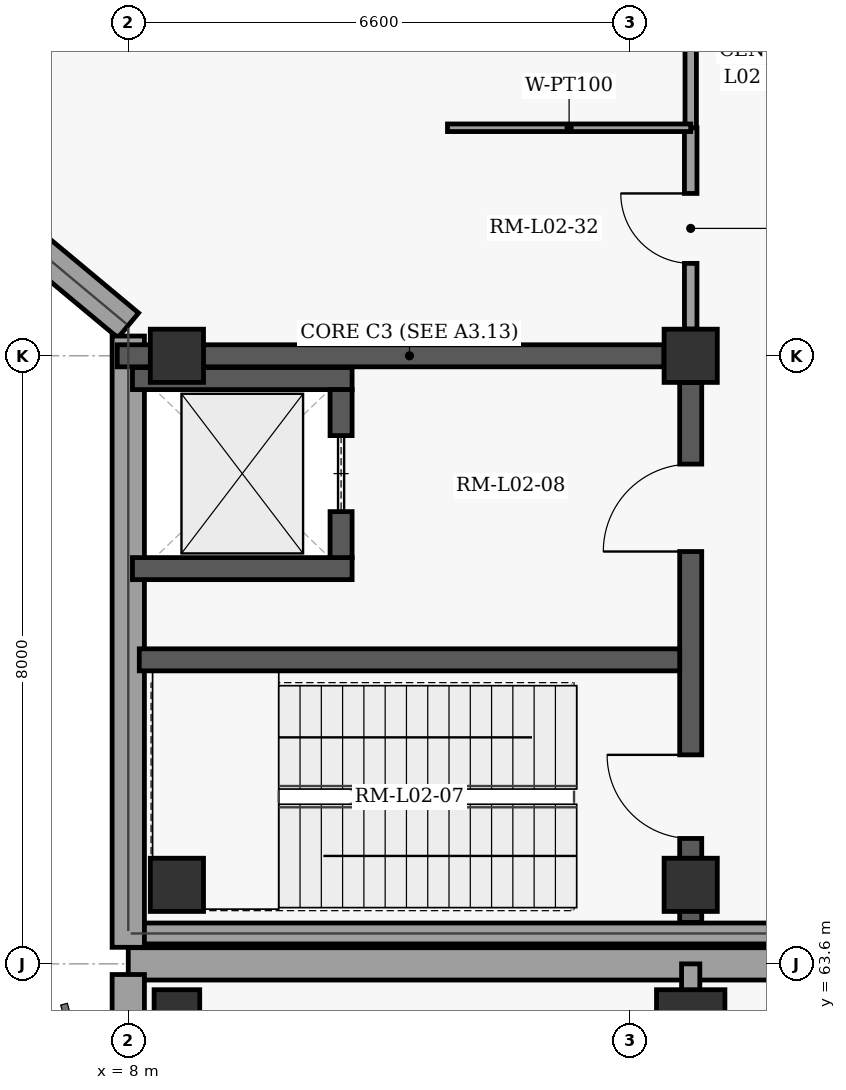
"""IFC4 building model, lengths in metres.
Left out: names, types, materials, properties, quantities, classifications, styles, units other than length and angle.
Written with IfcOpenShell. Run it as: python <this file> out.ifc"""

import sys

from ifc_helpers import new_model, si_unit, direction, frame, frame_2d, origin, origin_2d, place, context, subcontext, project, spatial, rectangle, extrude, element, fill, save


model = new_model("IFC4")
c1 = context("Model", 3, precision=1e-05, world=origin(), true_north=direction((0.0, 1.0)))
c2 = subcontext(c1, "Body", "Model", "MODEL_VIEW")
j1 = project(units=[si_unit("LENGTHUNIT", "METRE"), si_unit("PLANEANGLEUNIT", "RADIAN")], contexts=[c1])
p1 = place(None, origin())
s1 = spatial("IfcSite", under=j1, at=p1, CompositionType="ELEMENT")
p2 = place(p1, origin())
s2 = spatial("IfcBuilding", under=s1, at=p2, CompositionType="ELEMENT")
p3 = place(p2, frame((0.0, 0.0, 10.2)))
s3 = spatial("IfcBuildingStorey", under=s2, at=p3, CompositionType="ELEMENT", Elevation=10.2)
p4 = place(p3, frame((8.64, 62.96, 0.0), z_axis=(0.0, 0.0, 1.0), x_axis=(1.0, 0.0, 0.0)))
e1 = element("IfcColumn", 1, at=p4, inside=s3, PredefinedType="COLUMN", context=c2, shape_type="SweptSolid", body=[
    extrude(rectangle(XDim=0.6, YDim=0.6, at=origin_2d()), origin(), (0.0, 0.0, 1.0), 5.4),
])
p5 = place(p3, frame((15.4, 62.96, 0.0), z_axis=(0.0, 0.0, 1.0), x_axis=(1.0, 0.0, 0.0)))
e2 = element("IfcColumn", 2, at=p5, inside=s3, PredefinedType="COLUMN", context=c2, shape_type="SweptSolid", body=[
    extrude(rectangle(XDim=0.6, YDim=0.9, at=origin_2d()), origin(), (0.0, 0.0, 1.0), 5.4),
])
for number, where, z_axis, x_axis in (
    (3, (8.64, 64.64, 0.0), (0.0, 0.0, 1.0), (1.0, 0.0, 0.0)),
    (4, (8.64, 71.6, 0.0), (0.0, 0.0, 1.0), (1.0, 0.0, 0.0)),
    (5, (15.4, 64.64, 0.0), (0.0, 0.0, 1.0), (1.0, 0.0, 0.0)),
    (6, (15.4, 71.6, 0.0), (0.0, 0.0, 1.0), (1.0, 0.0, 0.0)),
):
    element("IfcColumn", number, at=place(p3, frame(where, z_axis=z_axis, x_axis=x_axis)), inside=s3, PredefinedType="COLUMN", context=c2, shape_type="SweptSolid", body=[
        extrude(rectangle(XDim=0.7, YDim=0.7, at=origin_2d()), origin(), (0.0, 0.0, 1.0), 5.4),
    ])
p6 = place(p3, frame((8.0, 63.6, 0.0), z_axis=(0.0, 0.0, 1.0), x_axis=(1.0, 0.0, 0.0)))
e7 = element("IfcWall", 7, at=p6, inside=s3, PredefinedType="SOLIDWALL", context=c2, shape_type="SweptSolid", body=[
    extrude(rectangle(XDim=38.0, YDim=0.425, at=frame_2d((19.0, 0.0))), origin(), (0.0, 0.0, 1.0), 5.16),
])
p7 = place(p3, frame((8.0, 7.74, 0.0), z_axis=(0.0, 0.0, 1.0), x_axis=(0.0, 1.0, 0.0)))
e8 = element("IfcWall", 8, at=p7, inside=s3, PredefinedType="SOLIDWALL", context=c2, shape_type="SweptSolid", body=[
    extrude(rectangle(XDim=55.72, YDim=0.425, at=frame_2d((27.86, 0.0))), origin(), (0.0, 0.0, 1.0), 5.16),
])
p8 = place(p3, frame((8.0, 72.0, 0.0), z_axis=(0.0, 0.0, 1.0), x_axis=(-0.768208468069, 0.640199773186, 0.0)))
e9 = element("IfcWall", 9, at=p8, inside=s3, PredefinedType="SOLIDWALL", context=c2, shape_type="SweptSolid", body=[
    extrude(rectangle(XDim=3.124, YDim=0.425, at=frame_2d((1.562, 0.0))), origin(), (0.0, 0.0, 1.0), 5.1),
])
p9 = place(p3, frame((40.2, 64.0, 0.0), z_axis=(0.0, 0.0, 1.0), x_axis=(-1.0, 0.0, 0.0)))
e10 = element("IfcWall", 10, at=p9, inside=s3, PredefinedType="SOLIDWALL", context=c2, shape_type="SweptSolid", body=[
    extrude(rectangle(XDim=32.2, YDim=0.275, at=frame_2d((16.1, 0.0))), origin(), (0.0, 0.0, 1.0), 3.7),
])
p10 = place(p3, frame((8.0, 63.818, 0.0), z_axis=(0.0, 0.0, 1.0), x_axis=(0.0, 1.0, 0.0)))
e11 = element("IfcWall", 11, at=p10, inside=s3, PredefinedType="SOLIDWALL", context=c2, shape_type="SweptSolid", body=[
    extrude(rectangle(XDim=8.042, YDim=0.425, at=frame_2d((4.021, 0.0))), origin(), (0.0, 0.0, 1.0), 5.1),
])
p11 = place(p3, frame((7.855, 71.6, 0.0), z_axis=(0.0, 0.0, 1.0), x_axis=(1.0, 0.0, 0.0)))
e12 = element("IfcWall", 12, at=p11, inside=s3, PredefinedType="SHEAR", context=c2, shape_type="SweptSolid", body=[
    extrude(rectangle(XDim=7.193, YDim=0.29, at=frame_2d((3.597, 0.0))), origin(), (0.0, 0.0, 1.0), 5.1),
])
p12 = place(p3, frame((15.4, 64.145, 0.0), z_axis=(0.0, 0.0, 1.0), x_axis=(0.0, 1.0, 0.0)))
e13 = element("IfcWall", 13, at=p12, inside=s3, PredefinedType="SHEAR", context=c2, shape_type="SweptSolid", body=[
    extrude(rectangle(XDim=7.103, YDim=0.29, at=frame_2d((3.552, 0.0))), origin(), (0.0, 0.0, 1.0), 5.1),
])
p13 = place(p12, frame((1.105, 0.0, 0.0)))
e14 = element("IfcOpeningElement", 14, at=p13, cuts=e13, PredefinedType="OPENING", context=c2, shape_type="SweptSolid", body=[
    extrude(rectangle(XDim=1.1, YDim=2.15, at=frame_2d((0.55, 1.075))), frame((0.0, 0.155, 0.0), z_axis=(0.0, -1.0, 0.0), x_axis=(1.0, 0.0, 0.0)), (0.0, 0.0, 1.0), 0.31),
])
p14 = place(p12, frame((4.88, 0.0, 0.0)))
e15 = element("IfcOpeningElement", 15, at=p14, cuts=e13, PredefinedType="OPENING", context=c2, shape_type="SweptSolid", body=[
    extrude(rectangle(XDim=1.15, YDim=2.2, at=frame_2d((0.575, 1.1))), frame((0.0, 0.155, 0.0), z_axis=(0.0, -1.0, 0.0), x_axis=(1.0, 0.0, 0.0)), (0.0, 0.0, 1.0), 0.31),
])
p15 = place(p3, frame((8.145, 67.6, 0.0), z_axis=(0.0, 0.0, 1.0), x_axis=(1.0, 0.0, 0.0)))
e16 = element("IfcWall", 16, at=p15, inside=s3, PredefinedType="SHEAR", context=c2, shape_type="SweptSolid", body=[
    extrude(rectangle(XDim=7.11, YDim=0.29, at=frame_2d((3.555, 0.0))), origin(), (0.0, 0.0, 1.0), 5.1),
])
for number, where, z_axis, x_axis in (
    (17, (8.055, 68.8, 0.0), (0.0, 0.0, 1.0), (1.0, 0.0, 0.0)),
    (18, (8.055, 71.3, 0.0), (0.0, 0.0, 1.0), (1.0, 0.0, 0.0)),
):
    element("IfcWall", number, at=place(p3, frame(where, z_axis=z_axis, x_axis=x_axis)), inside=s3, PredefinedType="SHEAR", context=c2, shape_type="SweptSolid", body=[
        extrude(rectangle(XDim=2.89, YDim=0.29, at=frame_2d((1.445, 0.0))), origin(), (0.0, 0.0, 1.0), 5.1),
    ])
p16 = place(p3, frame((10.8, 68.945, 0.0), z_axis=(0.0, 0.0, 1.0), x_axis=(0.0, 1.0, 0.0)))
e19 = element("IfcWall", 19, at=p16, inside=s3, PredefinedType="SHEAR", context=c2, shape_type="SweptSolid", body=[
    extrude(rectangle(XDim=2.21, YDim=0.29, at=frame_2d((1.105, 0.0))), origin(), (0.0, 0.0, 1.0), 5.1),
])
p17 = place(p16, frame((0.605, 0.0, 0.0)))
e20 = element("IfcOpeningElement", 20, at=p17, cuts=e19, PredefinedType="OPENING", context=c2, shape_type="SweptSolid", body=[
    extrude(rectangle(XDim=1.0, YDim=2.15, at=frame_2d((0.5, 1.075))), frame((0.0, 0.155, 0.0), z_axis=(0.0, -1.0, 0.0), x_axis=(1.0, 0.0, 0.0)), (0.0, 0.0, 1.0), 0.31),
])
p18 = place(p3, frame((15.4, 44.0, 0.0), z_axis=(0.0, 0.0, 1.0), x_axis=(0.0, 1.0, 0.0)))
e21 = element("IfcWall", 21, at=p18, inside=s3, PredefinedType="PARTITIONING", context=c2, shape_type="SweptSolid", body=[
    extrude(rectangle(XDim=19.6, YDim=0.24, at=frame_2d((9.8, 0.0))), origin(), (0.0, 0.0, 1.0), 4.31),
])
p19 = place(p18, frame((9.3, 0.0, 0.0)))
e22 = element("IfcOpeningElement", 22, at=p19, cuts=e21, PredefinedType="OPENING", context=c2, shape_type="SweptSolid", body=[
    extrude(rectangle(XDim=1.0, YDim=2.1, at=frame_2d((0.5, 1.05))), frame((0.0, 0.13, 0.0), z_axis=(0.0, -1.0, 0.0), x_axis=(1.0, 0.0, 0.0)), (0.0, 0.0, 1.0), 0.26),
])
p20 = place(p3, frame((15.4, 71.952, 0.0), z_axis=(0.0, 0.0, 1.0), x_axis=(0.0, 1.0, 0.0)))
e23 = element("IfcWall", 23, at=p20, inside=s3, PredefinedType="PARTITIONING", context=c2, shape_type="SweptSolid", body=[
    extrude(rectangle(XDim=2.648, YDim=0.165, at=frame_2d((1.324, 0.0))), origin(), (0.0, 0.0, 1.0), 4.25),
])
p21 = place(p20, frame((0.864, 0.0, 0.0)))
e24 = element("IfcOpeningElement", 24, at=p21, cuts=e23, PredefinedType="OPENING", context=c2, shape_type="SweptSolid", body=[
    extrude(rectangle(XDim=0.92, YDim=2.1, at=frame_2d((0.46, 1.05))), frame((0.0, 0.093, 0.0), z_axis=(0.0, -1.0, 0.0), x_axis=(1.0, 0.0, 0.0)), (0.0, 0.0, 1.0), 0.185),
])
p22 = place(p3, frame((15.4, 74.6, 0.0), z_axis=(0.0, 0.0, 1.0), x_axis=(0.0, 1.0, 0.0)))
e25 = element("IfcWall", 25, at=p22, inside=s3, PredefinedType="PARTITIONING", context=c2, shape_type="SweptSolid", body=[
    extrude(rectangle(XDim=19.4, YDim=0.15, at=frame_2d((9.7, 0.0))), origin(), (0.0, 0.0, 1.0), 4.25),
])
p23 = place(p22, frame((9.225, 0.0, 0.0)))
e26 = element("IfcOpeningElement", 26, at=p23, cuts=e25, PredefinedType="OPENING", context=c2, shape_type="SweptSolid", body=[
    extrude(rectangle(XDim=0.95, YDim=2.1, at=frame_2d((0.475, 1.05))), frame((0.0, 0.085, 0.0), z_axis=(0.0, -1.0, 0.0), x_axis=(1.0, 0.0, 0.0)), (0.0, 0.0, 1.0), 0.17),
])
p24 = place(p3, frame((12.2, 74.6, 0.0), z_axis=(0.0, 0.0, 1.0), x_axis=(1.0, 0.0, 0.0)))
e27 = element("IfcWall", 27, at=p24, inside=s3, PredefinedType="PARTITIONING", context=c2, shape_type="SweptSolid", body=[
    extrude(rectangle(XDim=3.2, YDim=0.1, at=frame_2d((1.6, 0.0))), origin(), (0.0, 0.0, 1.0), 5.1),
])
p25 = place(p13, origin())
e28 = element("IfcDoor", 28, at=p25, inside=s3, OperationType="SINGLE_SWING_RIGHT", PredefinedType="DOOR", context=c2, shape_type="SweptSolid", body=[
    extrude(rectangle(XDim=1.1, YDim=2.15, at=frame_2d((0.55, 1.075))), frame((0.0, 0.025, 0.0), z_axis=(0.0, -1.0, 0.0), x_axis=(1.0, 0.0, 0.0)), (0.0, 0.0, 1.0), 0.05),
])
fill(e14, e28)
p26 = place(p14, origin())
e29 = element("IfcDoor", 29, at=p26, inside=s3, OperationType="SINGLE_SWING_LEFT", PredefinedType="DOOR", context=c2, shape_type="SweptSolid", body=[
    extrude(rectangle(XDim=1.15, YDim=2.2, at=frame_2d((0.575, 1.1))), frame((0.0, 0.025, 0.0), z_axis=(0.0, -1.0, 0.0), x_axis=(1.0, 0.0, 0.0)), (0.0, 0.0, 1.0), 0.05),
])
fill(e15, e29)
p27 = place(p17, origin())
e30 = element("IfcDoor", 30, at=p27, inside=s3, OperationType="SLIDING_TO_LEFT", PredefinedType="DOOR", context=c2, shape_type="SweptSolid", body=[
    extrude(rectangle(XDim=1.0, YDim=2.15, at=frame_2d((0.5, 1.075))), frame((0.0, 0.025, 0.0), z_axis=(0.0, -1.0, 0.0), x_axis=(1.0, 0.0, 0.0)), (0.0, 0.0, 1.0), 0.05),
])
fill(e20, e30)
p28 = place(p21, origin())
e31 = element("IfcDoor", 31, at=p28, inside=s3, OperationType="SINGLE_SWING_RIGHT", PredefinedType="DOOR", context=c2, shape_type="SweptSolid", body=[
    extrude(rectangle(XDim=0.92, YDim=2.1, at=frame_2d((0.46, 1.05))), frame((0.0, 0.025, 0.0), z_axis=(0.0, -1.0, 0.0), x_axis=(1.0, 0.0, 0.0)), (0.0, 0.0, 1.0), 0.05),
])
fill(e24, e31)
save(model, sys.argv[1])
